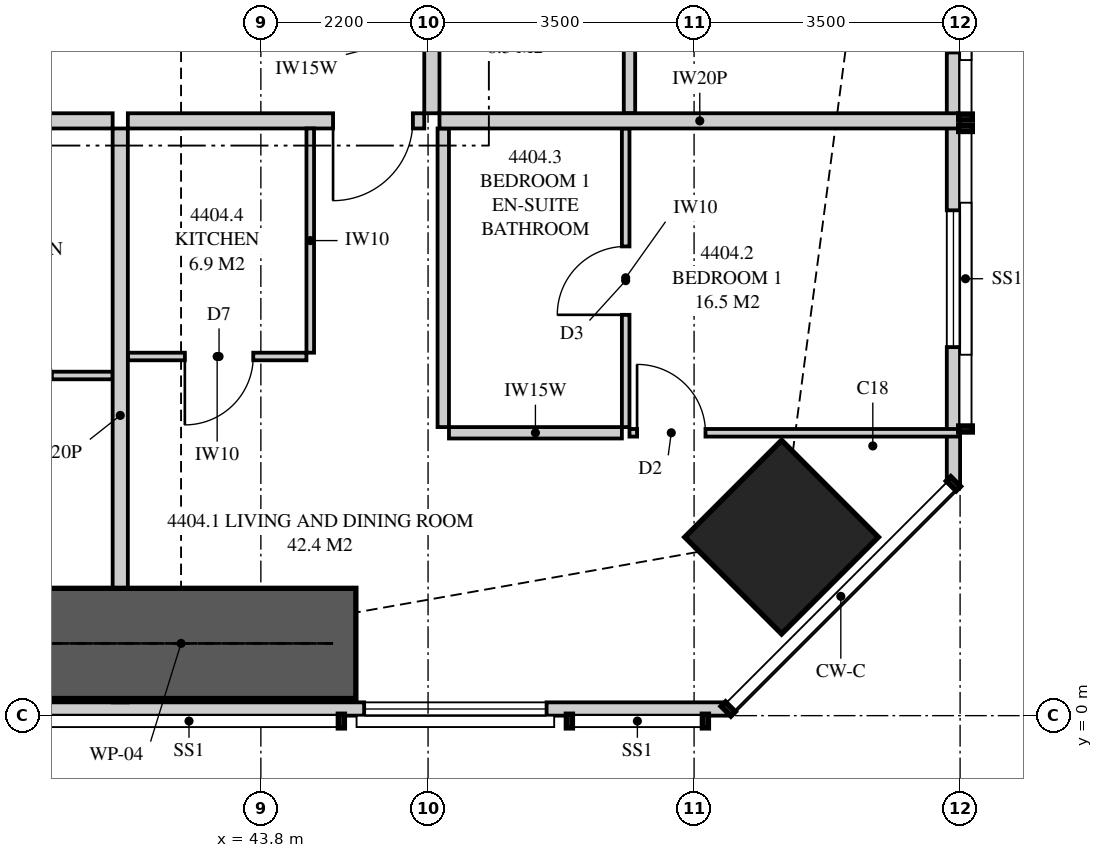
"""IFC4 building model, lengths in metres.
Left out: names, types, materials, properties, quantities, classifications, styles, units other than length and angle.
Written with IfcOpenShell. Run it as: python <this file> out.ifc"""

import sys

from ifc_helpers import new_model, si_unit, direction, frame, frame_2d, origin, origin_2d, place, context, subcontext, project, spatial, polyline, rectangle, outline, extrude, element, fill, save


model = new_model("IFC4")
c1 = context("Model", 3, precision=1e-05, world=origin(), true_north=direction((0.0, 1.0)))
c2 = subcontext(c1, "Body", "Model", "MODEL_VIEW")
j1 = project(units=[si_unit("LENGTHUNIT", "METRE"), si_unit("PLANEANGLEUNIT", "RADIAN")], contexts=[c1])
p1 = place(None, origin())
s1 = spatial("IfcSite", under=j1, at=p1, CompositionType="ELEMENT")
p2 = place(p1, origin())
s2 = spatial("IfcBuilding", under=s1, at=p2, CompositionType="ELEMENT")
p3 = place(p2, frame((0.0, 0.0, 164.4)))
s3 = spatial("IfcBuildingStorey", under=s2, at=p3, CompositionType="ELEMENT", Elevation=164.4)
p4 = place(p3, frame((50.652, 2.348, 0.0), z_axis=(0.0, 0.0, 1.0), x_axis=(0.707106781187, 0.707106781187, 0.0)))
e1 = element("IfcColumn", 1, at=p4, inside=s3, PredefinedType="COLUMN", context=c2, shape_type="SweptSolid", body=[
    extrude(rectangle(XDim=1.8, YDim=1.8, at=origin_2d()), origin(), (0.0, 0.0, 1.0), 3.35),
])
p5 = place(p3, frame((15.051, 0.087, 0.0), z_axis=(0.0, 0.0, 1.0), x_axis=(1.0, 0.0, 0.0)))
e2 = element("IfcWall", 2, at=p5, inside=s3, PredefinedType="SOLIDWALL", context=c2, shape_type="SweptSolid", body=[
    extrude(outline(polyline([(0.0, 0.0), (34.897, 0.0), (34.897, 3.11), (27.91, 3.11), (27.91, 2.15), (27.836, 2.15), (27.836, 3.11), (27.699, 3.11), (27.699, 2.15), (7.199, 2.15), (7.199, 3.11), (7.062, 3.11), (7.062, 2.15), (6.987, 2.15), (6.987, 3.11), (0.0, 3.11), (0.0, 0.0)])), frame((0.0, 0.087, 0.0), z_axis=(0.0, -1.0, 0.0), x_axis=(1.0, 0.0, 0.0)), (0.0, 0.0, 1.0), 0.175),
])
p6 = place(p5, frame((1.824, 0.0, 0.4)))
e3 = element("IfcOpeningElement", 3, at=p6, cuts=e2, PredefinedType="OPENING", context=c2, shape_type="SweptSolid", body=[
    extrude(rectangle(XDim=2.4, YDim=1.7, at=frame_2d((1.2, 0.85))), frame((0.0, 0.097, 0.0), z_axis=(0.0, -1.0, 0.0), x_axis=(1.0, 0.0, 0.0)), (0.0, 0.0, 1.0), 0.195),
])
p7 = place(p5, frame((10.399, 0.0, 0.0)))
e4 = element("IfcOpeningElement", 4, at=p7, cuts=e2, PredefinedType="OPENING", context=c2, shape_type="SweptSolid", body=[
    extrude(rectangle(XDim=1.8, YDim=2.1, at=frame_2d((0.9, 1.05))), frame((0.0, 0.097, 0.0), z_axis=(0.0, -1.0, 0.0), x_axis=(1.0, 0.0, 0.0)), (0.0, 0.0, 1.0), 0.195),
])
p8 = place(p5, frame((13.827, 0.0, 0.4)))
e5 = element("IfcOpeningElement", 5, at=p8, cuts=e2, PredefinedType="OPENING", context=c2, shape_type="SweptSolid", body=[
    extrude(rectangle(XDim=1.2, YDim=1.7, at=frame_2d((0.6, 0.85))), frame((0.0, 0.097, 0.0), z_axis=(0.0, -1.0, 0.0), x_axis=(1.0, 0.0, 0.0)), (0.0, 0.0, 1.0), 0.195),
])
p9 = place(p5, frame((22.799, 0.0, 0.0)))
e6 = element("IfcOpeningElement", 6, at=p9, cuts=e2, PredefinedType="OPENING", context=c2, shape_type="SweptSolid", body=[
    extrude(rectangle(XDim=1.8, YDim=2.1, at=frame_2d((0.9, 1.05))), frame((0.0, 0.097, 0.0), z_axis=(0.0, -1.0, 0.0), x_axis=(1.0, 0.0, 0.0)), (0.0, 0.0, 1.0), 0.195),
])
p10 = place(p5, frame((19.849, 0.0, 0.4)))
e7 = element("IfcOpeningElement", 7, at=p10, cuts=e2, PredefinedType="OPENING", context=c2, shape_type="SweptSolid", body=[
    extrude(rectangle(XDim=2.4, YDim=1.7, at=frame_2d((1.2, 0.85))), frame((0.0, 0.097, 0.0), z_axis=(0.0, -1.0, 0.0), x_axis=(1.0, 0.0, 0.0)), (0.0, 0.0, 1.0), 0.195),
])
p11 = place(p5, frame((30.108, 0.0, 0.4)))
e8 = element("IfcOpeningElement", 8, at=p11, cuts=e2, PredefinedType="OPENING", context=c2, shape_type="SweptSolid", body=[
    extrude(rectangle(XDim=2.4, YDim=1.7, at=frame_2d((1.2, 0.85))), frame((0.0, 0.097, 0.0), z_axis=(0.0, -1.0, 0.0), x_axis=(1.0, 0.0, 0.0)), (0.0, 0.0, 1.0), 0.195),
])
p12 = place(p3, frame((52.913, 3.051, 0.0), z_axis=(0.0, 0.0, 1.0), x_axis=(0.0, 1.0, 0.0)))
e9 = element("IfcWall", 9, at=p12, inside=s3, PredefinedType="SOLIDWALL", context=c2, shape_type="SweptSolid", body=[
    extrude(outline(polyline([(0.0, 0.0), (29.897, 0.0), (29.897, 3.11), (22.167, 3.11), (22.167, 2.15), (22.074, 2.15), (22.074, 3.11), (21.949, 3.11), (21.949, 2.15), (9.949, 2.15), (9.949, 3.11), (9.847, 3.11), (9.847, 2.15), (9.706, 2.15), (9.706, 3.11), (0.0, 3.11), (0.0, 0.0)])), frame((0.0, 0.087, 0.0), z_axis=(0.0, -1.0, 0.0), x_axis=(1.0, 0.0, 0.0)), (0.0, 0.0, 1.0), 0.175),
])
p13 = place(p12, frame((1.797, 0.0, 0.4)))
e10 = element("IfcOpeningElement", 10, at=p13, cuts=e9, PredefinedType="OPENING", context=c2, shape_type="SweptSolid", body=[
    extrude(rectangle(XDim=1.8, YDim=1.7, at=frame_2d((0.9, 0.85))), frame((0.0, 0.097, 0.0), z_axis=(0.0, -1.0, 0.0), x_axis=(1.0, 0.0, 0.0)), (0.0, 0.0, 1.0), 0.195),
])
p14 = place(p12, frame((5.674, 0.0, 0.4)))
e11 = element("IfcOpeningElement", 11, at=p14, cuts=e9, PredefinedType="OPENING", context=c2, shape_type="SweptSolid", body=[
    extrude(rectangle(XDim=1.8, YDim=1.7, at=frame_2d((0.9, 0.85))), frame((0.0, 0.097, 0.0), z_axis=(0.0, -1.0, 0.0), x_axis=(1.0, 0.0, 0.0)), (0.0, 0.0, 1.0), 0.195),
])
p15 = place(p12, frame((12.349, 0.0, 0.4)))
e12 = element("IfcOpeningElement", 12, at=p15, cuts=e9, PredefinedType="OPENING", context=c2, shape_type="SweptSolid", body=[
    extrude(rectangle(XDim=2.4, YDim=1.7, at=frame_2d((1.2, 0.85))), frame((0.0, 0.097, 0.0), z_axis=(0.0, -1.0, 0.0), x_axis=(1.0, 0.0, 0.0)), (0.0, 0.0, 1.0), 0.195),
])
p16 = place(p12, frame((15.274, 0.0, 0.0)))
e13 = element("IfcOpeningElement", 13, at=p16, cuts=e9, PredefinedType="OPENING", context=c2, shape_type="SweptSolid", body=[
    extrude(rectangle(XDim=1.8, YDim=2.1, at=frame_2d((0.9, 1.05))), frame((0.0, 0.097, 0.0), z_axis=(0.0, -1.0, 0.0), x_axis=(1.0, 0.0, 0.0)), (0.0, 0.0, 1.0), 0.195),
])
p17 = place(p12, frame((24.373, 0.0, 0.4)))
e14 = element("IfcOpeningElement", 14, at=p17, cuts=e9, PredefinedType="OPENING", context=c2, shape_type="SweptSolid", body=[
    extrude(rectangle(XDim=1.2, YDim=1.7, at=frame_2d((0.6, 0.85))), frame((0.0, 0.097, 0.0), z_axis=(0.0, -1.0, 0.0), x_axis=(1.0, 0.0, 0.0)), (0.0, 0.0, 1.0), 0.195),
])
p18 = place(p12, frame((26.801, 0.0, 0.4)))
e15 = element("IfcOpeningElement", 15, at=p18, cuts=e9, PredefinedType="OPENING", context=c2, shape_type="SweptSolid", body=[
    extrude(rectangle(XDim=1.8, YDim=1.7, at=frame_2d((0.9, 0.85))), frame((0.0, 0.097, 0.0), z_axis=(0.0, -1.0, 0.0), x_axis=(1.0, 0.0, 0.0)), (0.0, 0.0, 1.0), 0.195),
])
p19 = place(p3, frame((41.95, 0.175, 0.0), z_axis=(0.0, 0.0, 1.0), x_axis=(0.0, 1.0, 0.0)))
e16 = element("IfcWall", 16, at=p19, inside=s3, PredefinedType="PARTITIONING", context=c2, shape_type="SweptSolid", body=[
    extrude(outline(polyline([(0.529, 2.15), (0.0, 2.15), (0.0, 0.0), (0.529, 0.0), (0.529, 0.876), (1.021, 0.876), (1.021, 0.0), (7.55, 0.0), (7.55, 3.11), (1.685, 3.11), (1.685, 2.15), (1.021, 2.15), (1.021, 1.274), (0.529, 1.274), (0.529, 2.15)])), frame((0.0, 0.1, 0.0), z_axis=(0.0, -1.0, 0.0), x_axis=(1.0, 0.0, 0.0)), (0.0, 0.0, 1.0), 0.2),
])
p20 = place(p3, frame((42.05, 7.825, 0.0), z_axis=(0.0, 0.0, 1.0), x_axis=(1.0, 0.0, 0.0)))
e17 = element("IfcWall", 17, at=p20, inside=s3, PredefinedType="PARTITIONING", context=c2, shape_type="SweptSolid", body=[
    extrude(outline(polyline([(0.0, 0.0), (3.9, 0.0), (3.9, 3.11), (1.037, 3.11), (1.037, 2.541), (0.363, 2.541), (0.363, 3.11), (0.0, 3.11), (0.0, 0.0)])), frame((0.0, 0.1, 0.0), z_axis=(0.0, -1.0, 0.0), x_axis=(1.0, 0.0, 0.0)), (0.0, 0.0, 1.0), 0.2),
])
p21 = place(p20, frame((2.7, 0.0, 0.0)))
e18 = element("IfcOpeningElement", 18, at=p21, cuts=e17, PredefinedType="OPENING", context=c2, shape_type="SweptSolid", body=[
    extrude(rectangle(XDim=1.05, YDim=2.2, at=frame_2d((0.525, 1.1))), frame((0.0, 0.11, 0.0), z_axis=(0.0, -1.0, 0.0), x_axis=(1.0, 0.0, 0.0)), (0.0, 0.0, 1.0), 0.22),
])
p22 = place(p3, frame((48.6, 3.796, 0.0), z_axis=(0.0, 0.0, 1.0), x_axis=(0.0, 1.0, 0.0)))
e19 = element("IfcWall", 19, at=p22, inside=s3, PredefinedType="PARTITIONING", context=c2, shape_type="SweptSolid", body=[
    extrude(rectangle(XDim=3.929, YDim=0.1, at=frame_2d((1.964, 0.0))), origin(), (0.0, 0.0, 1.0), 3.11),
])
p23 = place(p22, frame((1.477, 0.0, 0.0)))
e20 = element("IfcOpeningElement", 20, at=p23, cuts=e19, PredefinedType="OPENING", context=c2, shape_type="SweptSolid", body=[
    extrude(rectangle(XDim=0.9, YDim=2.1, at=frame_2d((0.45, 1.05))), frame((0.0, 0.06, 0.0), z_axis=(0.0, -1.0, 0.0), x_axis=(1.0, 0.0, 0.0)), (0.0, 0.0, 1.0), 0.12),
])
p24 = place(p3, frame((48.65, 3.721, 0.0), z_axis=(0.0, 0.0, 1.0), x_axis=(1.0, 0.0, 0.0)))
e21 = element("IfcWall", 21, at=p24, inside=s3, PredefinedType="PARTITIONING", context=c2, shape_type="SweptSolid", body=[
    extrude(outline(polyline([(0.0, 0.0), (4.35, 0.0), (4.35, 3.11), (3.049, 3.11), (3.049, 2.15), (1.314, 2.15), (1.314, 3.11), (0.0, 3.11), (0.0, 0.0)])), frame((0.0, 0.05, 0.0), z_axis=(0.0, -1.0, 0.0), x_axis=(1.0, 0.0, 0.0)), (0.0, 0.0, 1.0), 0.1),
])
p25 = place(p24, frame((0.1, 0.0, 0.0)))
e22 = element("IfcOpeningElement", 22, at=p25, cuts=e21, PredefinedType="OPENING", context=c2, shape_type="SweptSolid", body=[
    extrude(rectangle(XDim=0.9, YDim=2.1, at=frame_2d((0.45, 1.05))), frame((0.0, 0.06, 0.0), z_axis=(0.0, -1.0, 0.0), x_axis=(1.0, 0.0, 0.0)), (0.0, 0.0, 1.0), 0.12),
])
p26 = place(p3, frame((46.275, 3.721, 0.0), z_axis=(0.0, 0.0, 1.0), x_axis=(1.0, 0.0, 0.0)))
e23 = element("IfcWall", 23, at=p26, inside=s3, PredefinedType="PLUMBINGWALL", context=c2, shape_type="SweptSolid", body=[
    extrude(rectangle(XDim=2.275, YDim=0.15, at=frame_2d((1.138, 0.0))), origin(), (0.0, 0.0, 1.0), 3.11),
])
p27 = place(p3, frame((46.2, 3.796, 0.0), z_axis=(0.0, 0.0, 1.0), x_axis=(0.0, 1.0, 0.0)))
e24 = element("IfcWall", 24, at=p27, inside=s3, PredefinedType="PLUMBINGWALL", context=c2, shape_type="SweptSolid", body=[
    extrude(rectangle(XDim=3.929, YDim=0.15, at=frame_2d((1.964, 0.0))), origin(), (0.0, 0.0, 1.0), 3.11),
])
p28 = place(p3, frame((42.05, 4.725, 0.0), z_axis=(0.0, 0.0, 1.0), x_axis=(1.0, 0.0, 0.0)))
e25 = element("IfcWall", 25, at=p28, inside=s3, PredefinedType="PARTITIONING", context=c2, shape_type="SweptSolid", body=[
    extrude(outline(polyline([(0.0, 0.0), (2.35, 0.0), (2.35, 3.11), (0.987, 3.11), (0.987, 2.541), (0.413, 2.541), (0.413, 3.11), (0.0, 3.11), (0.0, 0.0)])), frame((0.0, 0.05, 0.0), z_axis=(0.0, -1.0, 0.0), x_axis=(1.0, 0.0, 0.0)), (0.0, 0.0, 1.0), 0.1),
])
p29 = place(p28, frame((0.75, 0.0, 0.0)))
e26 = element("IfcOpeningElement", 26, at=p29, cuts=e25, PredefinedType="OPENING", context=c2, shape_type="SweptSolid", body=[
    extrude(rectangle(XDim=0.9, YDim=2.1, at=frame_2d((0.45, 1.05))), frame((0.0, 0.06, 0.0), z_axis=(0.0, -1.0, 0.0), x_axis=(1.0, 0.0, 0.0)), (0.0, 0.0, 1.0), 0.12),
])
p30 = place(p3, frame((44.45, 4.775, 0.0), z_axis=(0.0, 0.0, 1.0), x_axis=(0.0, 1.0, 0.0)))
e27 = element("IfcWall", 27, at=p30, inside=s3, PredefinedType="PARTITIONING", context=c2, shape_type="SweptSolid", body=[
    extrude(rectangle(XDim=2.95, YDim=0.1, at=frame_2d((1.475, 0.0))), origin(), (0.0, 0.0, 1.0), 3.11),
])
p31 = place(p3, frame((46.15, 7.825, 0.0), z_axis=(0.0, 0.0, 1.0), x_axis=(1.0, 0.0, 0.0)))
e28 = element("IfcWall", 28, at=p31, inside=s3, PredefinedType="PARTITIONING", context=c2, shape_type="SweptSolid", body=[
    extrude(outline(polyline([(0.0, 0.0), (6.85, 0.0), (6.85, 3.11), (6.138, 3.11), (6.138, 2.15), (4.303, 2.15), (4.303, 3.11), (0.0, 3.11), (0.0, 0.0)])), frame((0.0, 0.1, 0.0), z_axis=(0.0, -1.0, 0.0), x_axis=(1.0, 0.0, 0.0)), (0.0, 0.0, 1.0), 0.2),
])
p32 = place(p3, frame((46.05, 7.925, 0.0), z_axis=(0.0, 0.0, 1.0), x_axis=(0.0, 1.0, 0.0)))
e29 = element("IfcWall", 29, at=p32, inside=s3, PredefinedType="PARTITIONING", context=c2, shape_type="SweptSolid", body=[
    extrude(outline(polyline([(0.0, 0.0), (6.012, 0.0), (6.012, 3.11), (5.412, 3.11), (5.412, 2.541), (4.738, 2.541), (4.738, 3.11), (0.0, 3.11), (0.0, 0.0)])), frame((0.0, 0.1, 0.0), z_axis=(0.0, -1.0, 0.0), x_axis=(1.0, 0.0, 0.0)), (0.0, 0.0, 1.0), 0.2),
])
p33 = place(p3, frame((48.65, 7.925, 0.0), z_axis=(0.0, 0.0, 1.0), x_axis=(0.0, 1.0, 0.0)))
e30 = element("IfcWall", 30, at=p33, inside=s3, PredefinedType="PLUMBINGWALL", context=c2, shape_type="SweptSolid", body=[
    extrude(rectangle(XDim=3.45, YDim=0.15, at=frame_2d((1.725, 0.0))), origin(), (0.0, 0.0, 1.0), 3.11),
])
p34 = place(p33, frame((2.15, 0.0, 0.0)))
e31 = element("IfcOpeningElement", 31, at=p34, cuts=e30, PredefinedType="OPENING", context=c2, shape_type="SweptSolid", body=[
    extrude(rectangle(XDim=0.9, YDim=2.1, at=frame_2d((0.45, 1.05))), frame((0.0, 0.085, 0.0), z_axis=(0.0, -1.0, 0.0), x_axis=(1.0, 0.0, 0.0)), (0.0, 0.0, 1.0), 0.17),
])
p35 = place(p3, frame((39.175, 7.825, 0.0), z_axis=(0.0, 0.0, 1.0), x_axis=(1.0, 0.0, 0.0)))
e32 = element("IfcWall", 32, at=p35, inside=s3, PredefinedType="PARTITIONING", context=c2, shape_type="SweptSolid", body=[
    extrude(rectangle(XDim=2.675, YDim=0.2, at=frame_2d((1.337, 0.0))), origin(), (0.0, 0.0, 1.0), 3.11),
])
p36 = place(p3, frame((41.85, 4.475, 0.0), z_axis=(0.0, 0.0, 1.0), x_axis=(-1.0, 0.0, 0.0)))
e33 = element("IfcWall", 33, at=p36, inside=s3, PredefinedType="PARTITIONING", context=c2, shape_type="SweptSolid", body=[
    extrude(rectangle(XDim=2.5, YDim=0.1, at=frame_2d((1.25, 0.0))), origin(), (0.0, 0.0, 1.0), 3.11),
])
p37 = place(p36, frame((0.8, 0.0, 0.0)))
e34 = element("IfcOpeningElement", 34, at=p37, cuts=e33, PredefinedType="OPENING", context=c2, shape_type="SweptSolid", body=[
    extrude(rectangle(XDim=0.9, YDim=2.1, at=frame_2d((0.45, 1.05))), frame((0.0, 0.06, 0.0), z_axis=(0.0, -1.0, 0.0), x_axis=(1.0, 0.0, 0.0)), (0.0, 0.0, 1.0), 0.12),
])
p38 = place(p3, frame((40.45, 0.95, 0.0), z_axis=(0.0, 0.0, 1.0), x_axis=(1.0, 0.0, 0.0)))
e35 = element("IfcWall", 35, at=p38, inside=s3, PredefinedType="SHEAR", context=c2, shape_type="SweptSolid", body=[
    extrude(rectangle(XDim=4.6, YDim=1.45, at=frame_2d((2.3, 0.0))), origin(), (0.0, 0.0, 1.0), 3.35),
])
p39 = place(p11, origin())
e36 = element("IfcWindow", 36, at=p39, inside=s3, PartitioningType="SINGLE_PANEL", PredefinedType="WINDOW", context=c2, shape_type="SweptSolid", body=[
    extrude(rectangle(XDim=2.4, YDim=1.7, at=frame_2d((1.2, 0.85))), frame((0.0, 0.03, 0.0), z_axis=(0.0, -1.0, 0.0), x_axis=(1.0, 0.0, 0.0)), (0.0, 0.0, 1.0), 0.06),
])
fill(e8, e36)
p40 = place(p13, origin())
e37 = element("IfcWindow", 37, at=p40, inside=s3, PartitioningType="SINGLE_PANEL", PredefinedType="WINDOW", context=c2, shape_type="SweptSolid", body=[
    extrude(rectangle(XDim=1.8, YDim=1.7, at=frame_2d((0.9, 0.85))), frame((0.0, 0.03, 0.0), z_axis=(0.0, -1.0, 0.0), x_axis=(1.0, 0.0, 0.0)), (0.0, 0.0, 1.0), 0.06),
])
fill(e10, e37)
p41 = place(p14, origin())
e38 = element("IfcWindow", 38, at=p41, inside=s3, PartitioningType="SINGLE_PANEL", PredefinedType="WINDOW", context=c2, shape_type="SweptSolid", body=[
    extrude(rectangle(XDim=1.8, YDim=1.7, at=frame_2d((0.9, 0.85))), frame((0.0, 0.03, 0.0), z_axis=(0.0, -1.0, 0.0), x_axis=(1.0, 0.0, 0.0)), (0.0, 0.0, 1.0), 0.06),
])
fill(e11, e38)
p42 = place(p21, frame((1.05, 0.0, 0.0), z_axis=(0.0, 0.0, 1.0), x_axis=(-1.0, 0.0, 0.0)))
e39 = element("IfcDoor", 39, at=p42, inside=s3, OperationType="SINGLE_SWING_RIGHT", PredefinedType="DOOR", context=c2, shape_type="SweptSolid", body=[
    extrude(rectangle(XDim=1.05, YDim=2.2, at=frame_2d((0.525, 1.1))), frame((0.0, 0.025, 0.0), z_axis=(0.0, -1.0, 0.0), x_axis=(1.0, 0.0, 0.0)), (0.0, 0.0, 1.0), 0.05),
])
fill(e18, e39)
p43 = place(p25, origin())
e40 = element("IfcDoor", 40, at=p43, inside=s3, OperationType="SINGLE_SWING_LEFT", PredefinedType="DOOR", context=c2, shape_type="SweptSolid", body=[
    extrude(rectangle(XDim=0.9, YDim=2.1, at=frame_2d((0.45, 1.05))), frame((0.0, 0.025, 0.0), z_axis=(0.0, -1.0, 0.0), x_axis=(1.0, 0.0, 0.0)), (0.0, 0.0, 1.0), 0.05),
])
fill(e22, e40)
p44 = place(p23, origin())
e41 = element("IfcDoor", 41, at=p44, inside=s3, OperationType="SINGLE_SWING_LEFT", PredefinedType="DOOR", context=c2, shape_type="SweptSolid", body=[
    extrude(rectangle(XDim=0.9, YDim=2.1, at=frame_2d((0.45, 1.05))), frame((0.0, 0.025, 0.0), z_axis=(0.0, -1.0, 0.0), x_axis=(1.0, 0.0, 0.0)), (0.0, 0.0, 1.0), 0.05),
])
fill(e20, e41)
p45 = place(p29, frame((0.9, 0.0, 0.0), z_axis=(0.0, 0.0, 1.0), x_axis=(-1.0, 0.0, 0.0)))
e42 = element("IfcDoor", 42, at=p45, inside=s3, OperationType="SINGLE_SWING_RIGHT", PredefinedType="DOOR", context=c2, shape_type="SweptSolid", body=[
    extrude(rectangle(XDim=0.9, YDim=2.1, at=frame_2d((0.45, 1.05))), frame((0.0, 0.025, 0.0), z_axis=(0.0, -1.0, 0.0), x_axis=(1.0, 0.0, 0.0)), (0.0, 0.0, 1.0), 0.05),
])
fill(e26, e42)
save(model, sys.argv[1])
